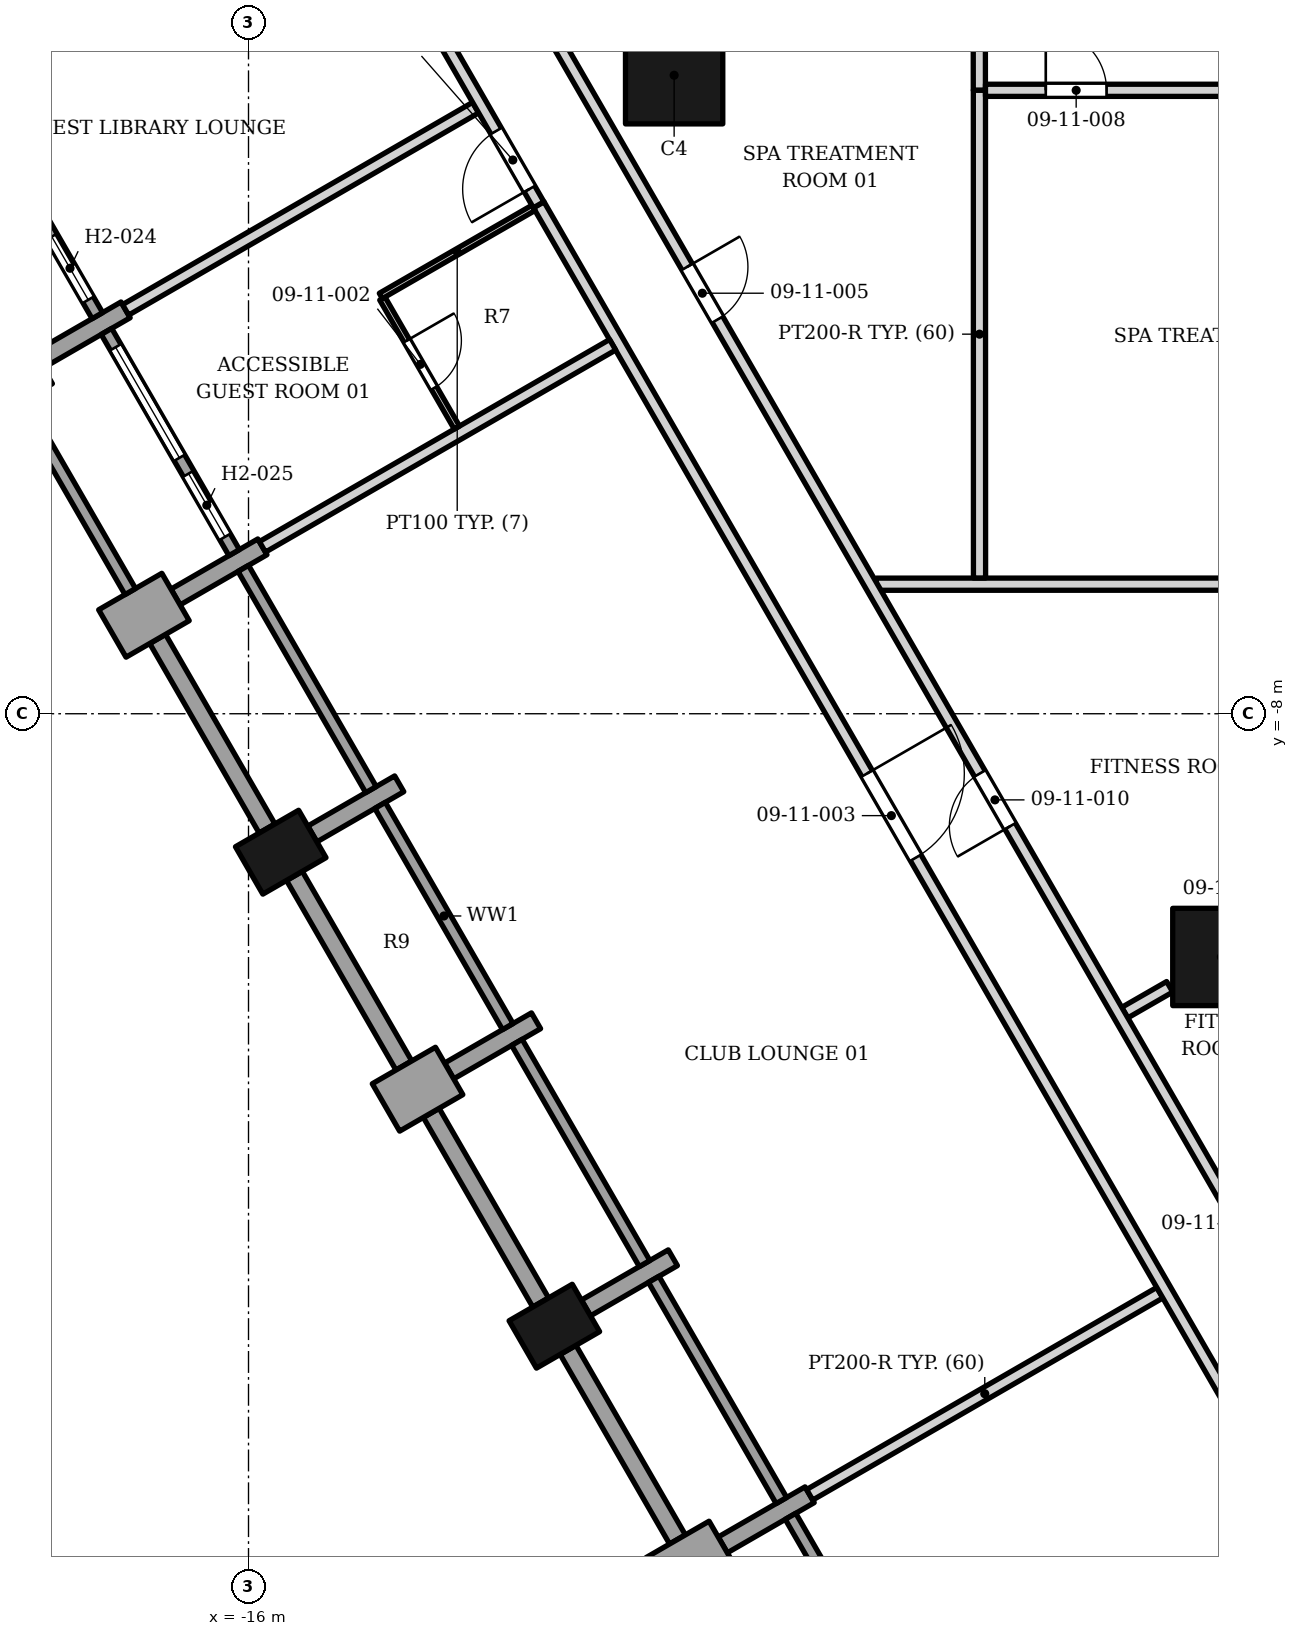
"""IFC4 building model, lengths in metres.
Left out: names, types, materials, properties, quantities, classifications, styles, units other than length and angle.
Written with IfcOpenShell. Run it as: python <this file> out.ifc"""

import sys

from ifc_helpers import new_model, si_unit, direction, frame, frame_2d, origin, origin_2d, place, context, subcontext, project, spatial, rectangle, extrude, element, fill, save


model = new_model("IFC4")
c1 = context("Model", 3, precision=1e-05, world=origin(), true_north=direction((0.0, 1.0)))
c2 = subcontext(c1, "Body", "Model", "MODEL_VIEW")
j1 = project(units=[si_unit("LENGTHUNIT", "METRE"), si_unit("PLANEANGLEUNIT", "RADIAN")], contexts=[c1])
p1 = place(None, origin())
s1 = spatial("IfcSite", under=j1, at=p1, CompositionType="ELEMENT")
p2 = place(p1, origin())
s2 = spatial("IfcBuilding", under=s1, at=p2, CompositionType="ELEMENT")
p3 = place(p2, frame((0.0, 0.0, 56.2)))
s3 = spatial("IfcBuildingStorey", under=s2, at=p3, CompositionType="ELEMENT", Elevation=56.2)
for number, where, z_axis, x_axis in (
    (1, (-9.0, 2.5, 0.0), (0.0, 0.0, 1.0), (1.0, 0.0, 0.0)),
    (2, (0.0, -12.0, 0.0), (0.0, 0.0, 1.0), (1.0, 0.0, 0.0)),
):
    element("IfcColumn", number, at=place(p3, frame(where, z_axis=z_axis, x_axis=x_axis)), inside=s3, PredefinedType="COLUMN", context=c2, shape_type="SweptSolid", body=[
        extrude(rectangle(XDim=1.6, YDim=1.6, at=origin_2d()), origin(), (0.0, 0.0, 1.0), 3.4),
    ])
for number, where, z_axis, x_axis in (
    (3, (-19.97, -2.483, 0.0), (0.0, 0.0, 1.0), (0.5, -0.866, 0.0)),
    (4, (-15.47, -10.277, 0.0), (0.0, 0.0, 1.0), (0.5, -0.866, 0.0)),
    (5, (-10.97, -18.072, 0.0), (0.0, 0.0, 1.0), (0.5, -0.866, 0.0)),
):
    element("IfcColumn", number, at=place(p3, frame(where, z_axis=z_axis, x_axis=x_axis)), inside=s3, PredefinedType="COLUMN", context=c2, shape_type="SweptSolid", body=[
        extrude(rectangle(XDim=0.9, YDim=1.2, at=origin_2d()), origin(), (0.0, 0.0, 1.0), 3.4),
    ])
p4 = place(p3, frame((-18.021, -1.358, 0.0), z_axis=(0.0, 0.0, 1.0), x_axis=(-0.866040211805, -0.499974350878, 0.0)))
e6 = element("IfcWall", 6, at=p4, inside=s3, PredefinedType="SOLIDWALL", context=c2, shape_type="SweptSolid", body=[
    extrude(rectangle(XDim=1.65, YDim=0.3, at=frame_2d((0.825, 0.0))), origin(), (0.0, 0.0, 1.0), 2.628),
])
p5 = place(p3, frame((-17.2, -6.08, 0.0), z_axis=(0.0, 0.0, 1.0), x_axis=(-0.866043267704, -0.499969057507, 0.0)))
e7 = element("IfcWall", 7, at=p5, inside=s3, PredefinedType="SOLIDWALL", context=c2, shape_type="SweptSolid", body=[
    extrude(rectangle(XDim=1.2, YDim=0.9, at=frame_2d((0.6, 0.0))), origin(), (0.0, 0.0, 1.0), 2.628),
])
p6 = place(p3, frame((-17.2, -6.08, 0.0), z_axis=(0.0, 0.0, 1.0), x_axis=(0.866040211805, 0.499974350878, 0.0)))
e8 = element("IfcWall", 8, at=p6, inside=s3, PredefinedType="SOLIDWALL", context=c2, shape_type="SweptSolid", body=[
    extrude(rectangle(XDim=1.65, YDim=0.3, at=frame_2d((0.825, 0.0))), origin(), (0.0, 0.0, 1.0), 2.65),
])
p7 = place(p3, frame((-14.95, -9.977, 0.0), z_axis=(0.0, 0.0, 1.0), x_axis=(0.866040211805, 0.499974350878, 0.0)))
e9 = element("IfcWall", 9, at=p7, inside=s3, PredefinedType="SOLIDWALL", context=c2, shape_type="SweptSolid", body=[
    extrude(rectangle(XDim=1.65, YDim=0.3, at=frame_2d((0.825, 0.0))), origin(), (0.0, 0.0, 1.0), 2.384),
])
p8 = place(p3, frame((-13.739, -14.475, 0.0), z_axis=(0.0, 0.0, 1.0), x_axis=(0.865955154139, 0.50012165622, 0.0)))
e10 = element("IfcWall", 10, at=p8, inside=s3, PredefinedType="SOLIDWALL", context=c2, shape_type="SweptSolid", body=[
    extrude(rectangle(XDim=1.2, YDim=0.9, at=frame_2d((0.6, 0.0))), origin(), (0.0, 0.0, 1.0), 2.63),
])
for number, where, z_axis, x_axis in (
    (11, (-11.271, -13.05, 0.0), (0.0, 0.0, 1.0), (-0.866, -0.5, 0.0)),
    (12, (-9.021, -16.947, 0.0), (0.0, 0.0, 1.0), (-0.866, -0.5, 0.0)),
):
    element("IfcWall", number, at=place(p3, frame(where, z_axis=z_axis, x_axis=x_axis)), inside=s3, PredefinedType="SOLIDWALL", context=c2, shape_type="SweptSolid", body=[
        extrude(rectangle(XDim=1.65, YDim=0.3, at=frame_2d((0.825, 0.0))), origin(), (0.0, 0.0, 1.0), 2.65),
    ])
p9 = place(p3, frame((-8.2, -21.669, 0.0), z_axis=(0.0, 0.0, 1.0), x_axis=(-0.865955154139, -0.50012165622, 0.0)))
e13 = element("IfcWall", 13, at=p9, inside=s3, PredefinedType="SOLIDWALL", context=c2, shape_type="SweptSolid", body=[
    extrude(rectangle(XDim=1.2, YDim=0.9, at=frame_2d((0.6, 0.0))), origin(), (0.0, 0.0, 1.0), 2.63),
])
p10 = place(p3, frame((-6.771, -20.844, 0.0), z_axis=(0.0, 0.0, 1.0), x_axis=(-0.866040211805, -0.499974350878, 0.0)))
e14 = element("IfcWall", 14, at=p10, inside=s3, PredefinedType="SOLIDWALL", context=c2, shape_type="SweptSolid", body=[
    extrude(rectangle(XDim=1.65, YDim=0.3, at=frame_2d((0.825, 0.0))), origin(), (0.0, 0.0, 1.0), 2.65),
])
p11 = place(p3, frame((-20.586, 2.184, 0.0), z_axis=(0.0, 0.0, 1.0), x_axis=(0.500027713859, -0.866009402589, 0.0)))
e15 = element("IfcWall", 15, at=p11, inside=s3, PredefinedType="ELEMENTEDWALL", context=c2, shape_type="SweptSolid", body=[
    extrude(rectangle(XDim=4.2, YDim=0.2, at=frame_2d((2.1, 0.0))), origin(), (0.0, 0.0, 1.0), 2.65),
])
p12 = place(p11, frame((0.3, 0.0, 0.6)))
e16 = element("IfcOpeningElement", 16, at=p12, cuts=e15, PredefinedType="OPENING", context=c2, shape_type="SweptSolid", body=[
    extrude(rectangle(XDim=2.1, YDim=1.8, at=frame_2d((1.05, 0.9))), frame((0.0, 0.11, 0.0), z_axis=(0.0, -1.0, 0.0), x_axis=(1.0, 0.0, 0.0)), (0.0, 0.0, 1.0), 0.22),
])
p13 = place(p11, frame((2.7, 0.0, 0.0)))
e17 = element("IfcOpeningElement", 17, at=p13, cuts=e15, PredefinedType="OPENING", context=c2, shape_type="SweptSolid", body=[
    extrude(rectangle(XDim=1.2, YDim=2.4, at=frame_2d((0.6, 1.2))), frame((0.0, 0.11, 0.0), z_axis=(0.0, -1.0, 0.0), x_axis=(1.0, 0.0, 0.0)), (0.0, 0.0, 1.0), 0.22),
])
p14 = place(p3, frame((-19.745, -2.873, 0.0), z_axis=(0.0, 0.0, 1.0), x_axis=(0.499961193289, -0.866047807691, 0.0)))
e18 = element("IfcWall", 18, at=p14, inside=s3, PredefinedType="SOLIDWALL", context=c2, shape_type="SweptSolid", body=[
    extrude(rectangle(XDim=3.6, YDim=0.2, at=frame_2d((1.8, 0.0))), origin(), (0.0, 0.0, 1.0), 2.628),
])
p15 = place(p3, frame((-18.336, -1.713, 0.0), z_axis=(0.0, 0.0, 1.0), x_axis=(0.500027713859, -0.866009402589, 0.0)))
e19 = element("IfcWall", 19, at=p15, inside=s3, PredefinedType="ELEMENTEDWALL", context=c2, shape_type="SweptSolid", body=[
    extrude(rectangle(XDim=4.2, YDim=0.2, at=frame_2d((2.1, 0.0))), origin(), (0.0, 0.0, 1.0), 2.628),
])
p16 = place(p15, frame((0.3, 0.0, 0.6)))
e20 = element("IfcOpeningElement", 20, at=p16, cuts=e19, PredefinedType="OPENING", context=c2, shape_type="SweptSolid", body=[
    extrude(rectangle(XDim=2.1, YDim=1.8, at=frame_2d((1.05, 0.9))), frame((0.0, 0.11, 0.0), z_axis=(0.0, -1.0, 0.0), x_axis=(1.0, 0.0, 0.0)), (0.0, 0.0, 1.0), 0.22),
])
p17 = place(p15, frame((2.7, 0.0, 0.0)))
e21 = element("IfcOpeningElement", 21, at=p17, cuts=e19, PredefinedType="OPENING", context=c2, shape_type="SweptSolid", body=[
    extrude(rectangle(XDim=1.2, YDim=2.4, at=frame_2d((0.6, 1.2))), frame((0.0, 0.11, 0.0), z_axis=(0.0, -1.0, 0.0), x_axis=(1.0, 0.0, 0.0)), (0.0, 0.0, 1.0), 0.22),
])
p18 = place(p3, frame((-15.695, -9.887, 0.0), z_axis=(0.0, 0.0, 1.0), x_axis=(-0.50001992892, 0.866013897511, 0.0)))
e22 = element("IfcWall", 22, at=p18, inside=s3, PredefinedType="SOLIDWALL", context=c2, shape_type="SweptSolid", body=[
    extrude(rectangle(XDim=3.599, YDim=0.3, at=frame_2d((1.8, 0.0))), origin(), (0.0, 0.0, 1.0), 2.63),
])
p19 = place(p3, frame((-16.086, -5.61, 0.0), z_axis=(0.0, 0.0, 1.0), x_axis=(0.500002543286, -0.866023935413, 0.0)))
e23 = element("IfcWall", 23, at=p19, inside=s3, PredefinedType="ELEMENTEDWALL", context=c2, shape_type="SweptSolid", body=[
    extrude(rectangle(XDim=4.2, YDim=0.2, at=frame_2d((2.1, 0.0))), origin(), (0.0, 0.0, 1.0), 2.65),
])
p20 = place(p3, frame((-15.245, -10.667, 0.0), z_axis=(0.0, 0.0, 1.0), x_axis=(0.499961193289, -0.866047807691, 0.0)))
e24 = element("IfcWall", 24, at=p20, inside=s3, PredefinedType="SOLIDWALL", context=c2, shape_type="SweptSolid", body=[
    extrude(rectangle(XDim=3.6, YDim=0.3, at=frame_2d((1.8, 0.0))), origin(), (0.0, 0.0, 1.0), 2.374),
])
p21 = place(p3, frame((-13.836, -9.507, 0.0), z_axis=(0.0, 0.0, 1.0), x_axis=(0.500027713859, -0.866009402589, 0.0)))
e25 = element("IfcWall", 25, at=p21, inside=s3, PredefinedType="ELEMENTEDWALL", context=c2, shape_type="SweptSolid", body=[
    extrude(rectangle(XDim=4.2, YDim=0.2, at=frame_2d((2.1, 0.0))), origin(), (0.0, 0.0, 1.0), 2.374),
])
p22 = place(p3, frame((-12.995, -14.564, 0.0), z_axis=(0.0, 0.0, 1.0), x_axis=(0.499961193289, -0.866047807691, 0.0)))
e26 = element("IfcWall", 26, at=p22, inside=s3, PredefinedType="SOLIDWALL", context=c2, shape_type="SweptSolid", body=[
    extrude(rectangle(XDim=3.6, YDim=0.3, at=frame_2d((1.8, 0.0))), origin(), (0.0, 0.0, 1.0), 2.63),
])
p23 = place(p3, frame((-11.586, -13.404, 0.0), z_axis=(0.0, 0.0, 1.0), x_axis=(0.500002543286, -0.866023935413, 0.0)))
e27 = element("IfcWall", 27, at=p23, inside=s3, PredefinedType="ELEMENTEDWALL", context=c2, shape_type="SweptSolid", body=[
    extrude(rectangle(XDim=4.2, YDim=0.2, at=frame_2d((2.1, 0.0))), origin(), (0.0, 0.0, 1.0), 2.65),
])
p24 = place(p3, frame((-10.745, -18.461, 0.0), z_axis=(0.0, 0.0, 1.0), x_axis=(0.499961193289, -0.866047807691, 0.0)))
e28 = element("IfcWall", 28, at=p24, inside=s3, PredefinedType="SOLIDWALL", context=c2, shape_type="SweptSolid", body=[
    extrude(rectangle(XDim=3.6, YDim=0.3, at=frame_2d((1.8, 0.0))), origin(), (0.0, 0.0, 1.0), 2.63),
])
for number, where, z_axis, x_axis in (
    (29, (-9.336, -17.302, 0.0), (0.0, 0.0, 1.0), (0.5, -0.866, 0.0)),
    (30, (-7.086, -21.199, 0.0), (0.0, 0.0, 1.0), (0.5, -0.866, 0.0)),
):
    element("IfcWall", number, at=place(p3, frame(where, z_axis=z_axis, x_axis=x_axis)), inside=s3, PredefinedType="ELEMENTEDWALL", context=c2, shape_type="SweptSolid", body=[
        extrude(rectangle(XDim=4.2, YDim=0.2, at=frame_2d((2.1, 0.0))), origin(), (0.0, 0.0, 1.0), 2.65),
    ])
p25 = place(p3, frame((-6.771, -20.844, 0.0), z_axis=(0.0, 0.0, 1.0), x_axis=(0.866140962391, 0.499799793185, 0.0)))
e31 = element("IfcWall", 31, at=p25, inside=s3, PredefinedType="PARTITIONING", context=c2, shape_type="SweptSolid", body=[
    extrude(rectangle(XDim=6.65, YDim=0.2, at=frame_2d((3.325, 0.0))), origin(), (0.0, 0.0, 1.0), 2.552),
])
p26 = place(p3, frame((-11.227, 0.37, 0.0), z_axis=(0.0, 0.0, 1.0), x_axis=(0.500006900114, -0.866021419965, 0.0)))
e32 = element("IfcWall", 32, at=p26, inside=s3, PredefinedType="PARTITIONING", context=c2, shape_type="SweptSolid", body=[
    extrude(rectangle(XDim=22.586, YDim=0.2, at=frame_2d((11.293, 0.0))), origin(), (0.0, 0.0, 1.0), 2.374),
])
p27 = place(p26, frame((10.8, 0.0, 0.0)))
e33 = element("IfcOpeningElement", 33, at=p27, cuts=e32, PredefinedType="OPENING", context=c2, shape_type="SweptSolid", body=[
    extrude(rectangle(XDim=1.6, YDim=2.1, at=frame_2d((0.8, 1.05))), frame((0.0, 0.11, 0.0), z_axis=(0.0, -1.0, 0.0), x_axis=(1.0, 0.0, 0.0)), (0.0, 0.0, 1.0), 0.22),
])
p28 = place(p3, frame((-1.591, -12.916, 0.0), z_axis=(0.0, 0.0, 1.0), x_axis=(0.866903215232, 0.498476494351, 0.0)))
e34 = element("IfcWall", 34, at=p28, inside=s3, PredefinedType="PARTITIONING", context=c2, shape_type="SweptSolid", body=[
    extrude(rectangle(XDim=0.854, YDim=0.2, at=frame_2d((0.427, 0.0))), origin(), (0.0, 0.0, 1.0), 3.23),
])
p29 = place(p3, frame((-5.674, -5.87, 0.0), z_axis=(0.0, 0.0, 1.0), x_axis=(0.999999987222, 0.000159861147, 0.0)))
e35 = element("IfcWall", 35, at=p29, inside=s3, PredefinedType="PARTITIONING", context=c2, shape_type="SweptSolid", body=[
    extrude(rectangle(XDim=10.69, YDim=0.2, at=frame_2d((5.345, 0.0))), origin(), (0.0, 0.0, 1.0), 3.23),
])
p30 = place(p3, frame((-15.771, -5.255, 0.0), z_axis=(0.0, 0.0, 1.0), x_axis=(0.866166026107, 0.499756355856, 0.0)))
e36 = element("IfcWall", 36, at=p30, inside=s3, PredefinedType="PARTITIONING", context=c2, shape_type="SweptSolid", body=[
    extrude(rectangle(XDim=6.65, YDim=0.2, at=frame_2d((3.325, 0.0))), origin(), (0.0, 0.0, 1.0), 2.384),
])
p31 = place(p3, frame((-18.021, -1.358, 0.0), z_axis=(0.0, 0.0, 1.0), x_axis=(0.865919508558, 0.500183371074, 0.0)))
e37 = element("IfcWall", 37, at=p31, inside=s3, PredefinedType="PARTITIONING", context=c2, shape_type="SweptSolid", body=[
    extrude(rectangle(XDim=6.648, YDim=0.2, at=frame_2d((3.324, 0.0))), origin(), (0.0, 0.0, 1.0), 2.384),
])
p32 = place(p3, frame((-13.799, -1.172, 0.0), z_axis=(0.0, 0.0, 1.0), x_axis=(0.500018594424, -0.866014668023, 0.0)))
e38 = element("IfcWall", 38, at=p32, inside=s3, PredefinedType="PARTITIONING", context=c2, shape_type="SweptSolid", body=[
    extrude(rectangle(XDim=2.45, YDim=0.1, at=frame_2d((1.225, 0.0))), origin(), (0.0, 0.0, 1.0), 2.384),
])
p33 = place(p32, frame((0.8, 0.0, 0.0)))
e39 = element("IfcOpeningElement", 39, at=p33, cuts=e38, PredefinedType="OPENING", context=c2, shape_type="SweptSolid", body=[
    extrude(rectangle(XDim=0.9, YDim=2.1, at=frame_2d((0.45, 1.05))), frame((0.0, 0.06, 0.0), z_axis=(0.0, -1.0, 0.0), x_axis=(1.0, 0.0, 0.0)), (0.0, 0.0, 1.0), 0.12),
])
p34 = place(p3, frame((-13.823, -1.129, 0.0), z_axis=(0.0, 0.0, 1.0), x_axis=(0.866314505181, 0.49949892704, 0.0)))
e40 = element("IfcWall", 40, at=p34, inside=s3, PredefinedType="PARTITIONING", context=c2, shape_type="SweptSolid", body=[
    extrude(rectangle(XDim=2.9, YDim=0.1, at=frame_2d((1.45, 0.0))), origin(), (0.0, 0.0, 1.0), 2.384),
])
p35 = place(p3, frame((-13.147, 3.699, 0.0), z_axis=(0.0, 0.0, 1.0), x_axis=(0.499337423021, -0.866407604982, 0.0)))
e41 = element("IfcWall", 41, at=p35, inside=s3, PredefinedType="PARTITIONING", context=c2, shape_type="SweptSolid", body=[
    extrude(rectangle(XDim=3.843, YDim=0.2, at=frame_2d((1.921, 0.0))), origin(), (0.0, 0.0, 1.0), 3.23),
])
p36 = place(p35, frame((2.443, 0.0, 0.0)))
e42 = element("IfcOpeningElement", 42, at=p36, cuts=e41, PredefinedType="OPENING", context=c2, shape_type="SweptSolid", body=[
    extrude(rectangle(XDim=1.1, YDim=2.1, at=frame_2d((0.55, 1.05))), frame((0.0, 0.11, 0.0), z_axis=(0.0, -1.0, 0.0), x_axis=(1.0, 0.0, 0.0)), (0.0, 0.0, 1.0), 0.22),
])
p37 = place(p3, frame((-3.982, 4.25, 0.0), z_axis=(0.0, 0.0, 1.0), x_axis=(0.000855327155, -0.999999634208, 0.0)))
e43 = element("IfcWall", 43, at=p37, inside=s3, PredefinedType="PARTITIONING", context=c2, shape_type="SweptSolid", body=[
    extrude(rectangle(XDim=1.998, YDim=0.2, at=frame_2d((0.999, 0.0))), origin(), (0.0, 0.0, 1.0), 3.23),
])
p38 = place(p3, frame((-3.979, 2.252, 0.0), z_axis=(0.0, 0.0, 1.0), x_axis=(0.000213083311, -0.999999977298, 0.0)))
e44 = element("IfcWall", 44, at=p38, inside=s3, PredefinedType="PARTITIONING", context=c2, shape_type="SweptSolid", body=[
    extrude(rectangle(XDim=8.02, YDim=0.2, at=frame_2d((4.01, 0.0))), origin(), (0.0, 0.0, 1.0), 3.23),
])
p39 = place(p3, frame((-3.879, 2.252, 0.0), z_axis=(0.0, 0.0, 1.0), x_axis=(1.0, 0.0, 0.0)))
e45 = element("IfcWall", 45, at=p39, inside=s3, PredefinedType="PARTITIONING", context=c2, shape_type="SweptSolid", body=[
    extrude(rectangle(XDim=7.859, YDim=0.2, at=frame_2d((3.93, 0.0))), origin(), (0.0, 0.0, 1.0), 2.474),
])
p40 = place(p39, frame((0.991, 0.0, 0.0)))
e46 = element("IfcOpeningElement", 46, at=p40, cuts=e45, PredefinedType="OPENING", context=c2, shape_type="SweptSolid", body=[
    extrude(rectangle(XDim=1.0, YDim=2.1, at=frame_2d((0.5, 1.05))), frame((0.0, 0.11, 0.0), z_axis=(0.0, -1.0, 0.0), x_axis=(1.0, 0.0, 0.0)), (0.0, 0.0, 1.0), 0.22),
])
p41 = place(p39, frame((6.363, 0.0, 0.0)))
e47 = element("IfcOpeningElement", 47, at=p41, cuts=e45, PredefinedType="OPENING", context=c2, shape_type="SweptSolid", body=[
    extrude(rectangle(XDim=1.0, YDim=2.1, at=frame_2d((0.5, 1.05))), frame((0.0, 0.11, 0.0), z_axis=(0.0, -1.0, 0.0), x_axis=(1.0, 0.0, 0.0)), (0.0, 0.0, 1.0), 0.22),
])
p42 = place(p3, frame((-11.299, 3.7, 0.0), z_axis=(0.0, 0.0, 1.0), x_axis=(0.500141073811, -0.86594393946, 0.0)))
e48 = element("IfcWall", 48, at=p42, inside=s3, PredefinedType="PARTITIONING", context=c2, shape_type="SweptSolid", body=[
    extrude(rectangle(XDim=22.733, YDim=0.2, at=frame_2d((11.367, 0.0))), origin(), (0.0, 0.0, 1.0), 2.374),
])
p43 = place(p42, frame((5.025, 0.0, 0.0)))
e49 = element("IfcOpeningElement", 49, at=p43, cuts=e48, PredefinedType="OPENING", context=c2, shape_type="SweptSolid", body=[
    extrude(rectangle(XDim=1.0, YDim=2.1, at=frame_2d((0.5, 1.05))), frame((0.0, 0.11, 0.0), z_axis=(0.0, -1.0, 0.0), x_axis=(1.0, 0.0, 0.0)), (0.0, 0.0, 1.0), 0.22),
])
p44 = place(p42, frame((14.647, 0.0, 0.0)))
e50 = element("IfcOpeningElement", 50, at=p44, cuts=e48, PredefinedType="OPENING", context=c2, shape_type="SweptSolid", body=[
    extrude(rectangle(XDim=1.0, YDim=2.1, at=frame_2d((0.5, 1.05))), frame((0.0, 0.11, 0.0), z_axis=(0.0, -1.0, 0.0), x_axis=(1.0, 0.0, 0.0)), (0.0, 0.0, 1.0), 0.22),
])
p45 = place(p13, origin())
e51 = element("IfcDoor", 51, at=p45, inside=s3, OperationType="SINGLE_SWING_LEFT", PredefinedType="DOOR", context=c2, shape_type="SweptSolid", body=[
    extrude(rectangle(XDim=1.2, YDim=2.4, at=frame_2d((0.6, 1.2))), frame((0.0, 0.025, 0.0), z_axis=(0.0, -1.0, 0.0), x_axis=(1.0, 0.0, 0.0)), (0.0, 0.0, 1.0), 0.05),
])
fill(e17, e51)
p46 = place(p16, origin())
e52 = element("IfcWindow", 52, at=p46, inside=s3, PartitioningType="SINGLE_PANEL", PredefinedType="WINDOW", context=c2, shape_type="SweptSolid", body=[
    extrude(rectangle(XDim=2.1, YDim=1.8, at=frame_2d((1.05, 0.9))), frame((0.0, 0.03, 0.0), z_axis=(0.0, -1.0, 0.0), x_axis=(1.0, 0.0, 0.0)), (0.0, 0.0, 1.0), 0.06),
])
fill(e20, e52)
p47 = place(p17, origin())
e53 = element("IfcDoor", 53, at=p47, inside=s3, OperationType="SINGLE_SWING_LEFT", PredefinedType="DOOR", context=c2, shape_type="SweptSolid", body=[
    extrude(rectangle(XDim=1.2, YDim=2.4, at=frame_2d((0.6, 1.2))), frame((0.0, 0.025, 0.0), z_axis=(0.0, -1.0, 0.0), x_axis=(1.0, 0.0, 0.0)), (0.0, 0.0, 1.0), 0.05),
])
fill(e21, e53)
p48 = place(p36, origin())
e54 = element("IfcDoor", 54, at=p48, inside=s3, OperationType="SINGLE_SWING_RIGHT", PredefinedType="DOOR", context=c2, shape_type="SweptSolid", body=[
    extrude(rectangle(XDim=1.1, YDim=2.1, at=frame_2d((0.55, 1.05))), frame((0.0, 0.025, 0.0), z_axis=(0.0, -1.0, 0.0), x_axis=(1.0, 0.0, 0.0)), (0.0, 0.0, 1.0), 0.05),
])
fill(e42, e54)
p49 = place(p33, origin())
e55 = element("IfcDoor", 55, at=p49, inside=s3, OperationType="SINGLE_SWING_LEFT", PredefinedType="DOOR", context=c2, shape_type="SweptSolid", body=[
    extrude(rectangle(XDim=0.9, YDim=2.1, at=frame_2d((0.45, 1.05))), frame((0.0, 0.025, 0.0), z_axis=(0.0, -1.0, 0.0), x_axis=(1.0, 0.0, 0.0)), (0.0, 0.0, 1.0), 0.05),
])
fill(e39, e55)
p50 = place(p27, origin())
e56 = element("IfcDoor", 56, at=p50, inside=s3, OperationType="DOUBLE_DOOR_SINGLE_SWING", PredefinedType="DOOR", context=c2, shape_type="SweptSolid", body=[
    extrude(rectangle(XDim=1.6, YDim=2.1, at=frame_2d((0.8, 1.05))), frame((0.0, 0.025, 0.0), z_axis=(0.0, -1.0, 0.0), x_axis=(1.0, 0.0, 0.0)), (0.0, 0.0, 1.0), 0.05),
])
fill(e33, e56)
p51 = place(p43, origin())
e57 = element("IfcDoor", 57, at=p51, inside=s3, OperationType="SINGLE_SWING_LEFT", PredefinedType="DOOR", context=c2, shape_type="SweptSolid", body=[
    extrude(rectangle(XDim=1.0, YDim=2.1, at=frame_2d((0.5, 1.05))), frame((0.0, 0.025, 0.0), z_axis=(0.0, -1.0, 0.0), x_axis=(1.0, 0.0, 0.0)), (0.0, 0.0, 1.0), 0.05),
])
fill(e49, e57)
p52 = place(p40, origin())
e58 = element("IfcDoor", 58, at=p52, inside=s3, OperationType="SINGLE_SWING_LEFT", PredefinedType="DOOR", context=c2, shape_type="SweptSolid", body=[
    extrude(rectangle(XDim=1.0, YDim=2.1, at=frame_2d((0.5, 1.05))), frame((0.0, 0.025, 0.0), z_axis=(0.0, -1.0, 0.0), x_axis=(1.0, 0.0, 0.0)), (0.0, 0.0, 1.0), 0.05),
])
fill(e46, e58)
p53 = place(p44, origin())
e59 = element("IfcDoor", 59, at=p53, inside=s3, OperationType="SINGLE_SWING_RIGHT", PredefinedType="DOOR", context=c2, shape_type="SweptSolid", body=[
    extrude(rectangle(XDim=1.0, YDim=2.1, at=frame_2d((0.5, 1.05))), frame((0.0, 0.025, 0.0), z_axis=(0.0, -1.0, 0.0), x_axis=(1.0, 0.0, 0.0)), (0.0, 0.0, 1.0), 0.05),
])
fill(e50, e59)
save(model, sys.argv[1])
